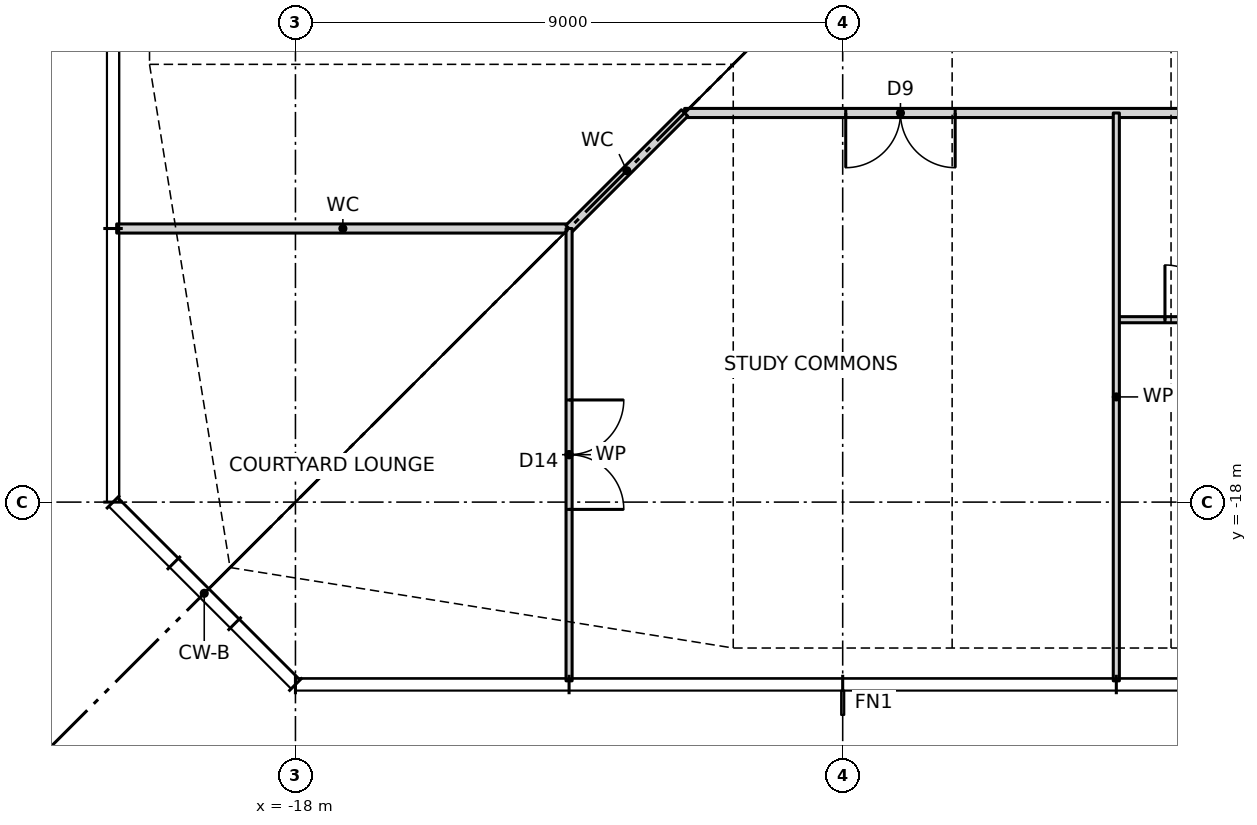
"""IFC4 building model, lengths in metres.
Left out: names, types, materials, properties, quantities, classifications, styles, units other than length and angle.
Written with IfcOpenShell. Run it as: python <this file> out.ifc"""

import sys

from ifc_helpers import new_model, si_unit, direction, frame, frame_2d, origin, place, context, subcontext, project, spatial, rectangle, extrude, element, fill, save


model = new_model("IFC4")
c1 = context("Model", 3, precision=1e-05, world=origin(), true_north=direction((0.0, 1.0)))
c2 = subcontext(c1, "Body", "Model", "MODEL_VIEW")
j1 = project(units=[si_unit("LENGTHUNIT", "METRE"), si_unit("PLANEANGLEUNIT", "RADIAN")], contexts=[c1])
p1 = place(None, origin())
s1 = spatial("IfcSite", under=j1, at=p1, CompositionType="ELEMENT")
p2 = place(p1, origin())
s2 = spatial("IfcBuilding", under=s1, at=p2, CompositionType="ELEMENT")
p3 = place(p2, frame((0.0, 0.0, 140.0)))
s3 = spatial("IfcBuildingStorey", under=s2, at=p3, CompositionType="ELEMENT", Elevation=140.0)
p4 = place(p3, frame((-4.5, -15.0, 0.0), z_axis=(0.0, 0.0, 1.0), x_axis=(1.0, 0.0, 0.0)))
e1 = element("IfcWall", 1, at=p4, inside=s3, PredefinedType="PARTITIONING", context=c2, shape_type="SweptSolid", body=[
    extrude(rectangle(XDim=13.5, YDim=0.1, at=frame_2d((6.75, 0.0))), origin(), (0.0, 0.0, 1.0), 3.2),
])
p5 = place(p4, frame((0.8, 0.0, 0.0)))
e2 = element("IfcOpeningElement", 2, at=p5, cuts=e1, PredefinedType="OPENING", context=c2, shape_type="SweptSolid", body=[
    extrude(rectangle(XDim=0.9, YDim=2.1, at=frame_2d((0.45, 1.05))), frame((0.0, 0.06, 0.0), z_axis=(0.0, -1.0, 0.0), x_axis=(1.0, 0.0, 0.0)), (0.0, 0.0, 1.0), 0.12),
])
p6 = place(p4, frame((7.3, 0.0, 0.0)))
e3 = element("IfcOpeningElement", 3, at=p6, cuts=e1, PredefinedType="OPENING", context=c2, shape_type="SweptSolid", body=[
    extrude(rectangle(XDim=0.9, YDim=2.1, at=frame_2d((0.45, 1.05))), frame((0.0, 0.06, 0.0), z_axis=(0.0, -1.0, 0.0), x_axis=(1.0, 0.0, 0.0)), (0.0, 0.0, 1.0), 0.12),
])
p7 = place(p4, frame((9.8, 0.0, 0.0)))
e4 = element("IfcOpeningElement", 4, at=p7, cuts=e1, PredefinedType="OPENING", context=c2, shape_type="SweptSolid", body=[
    extrude(rectangle(XDim=0.9, YDim=2.1, at=frame_2d((0.45, 1.05))), frame((0.0, 0.06, 0.0), z_axis=(0.0, -1.0, 0.0), x_axis=(1.0, 0.0, 0.0)), (0.0, 0.0, 1.0), 0.12),
])
p8 = place(p3, frame((-20.94, -13.5, 0.0), z_axis=(0.0, 0.0, 1.0), x_axis=(1.0, 0.0, 0.0)))
e5 = element("IfcWall", 5, at=p8, inside=s3, PredefinedType="PARTITIONING", context=c2, shape_type="SweptSolid", body=[
    extrude(rectangle(XDim=7.44, YDim=0.15, at=frame_2d((3.72, 0.0))), origin(), (0.0, 0.0, 1.0), 3.2),
])
p9 = place(p3, frame((-11.6, -11.6, 0.0), z_axis=(0.0, 0.0, 1.0), x_axis=(1.0, 0.0, 0.0)))
e6 = element("IfcWall", 6, at=p9, inside=s3, PredefinedType="PARTITIONING", context=c2, shape_type="SweptSolid", body=[
    extrude(rectangle(XDim=20.6, YDim=0.15, at=frame_2d((10.3, 0.0))), origin(), (0.0, 0.0, 1.0), 3.2),
])
p10 = place(p9, frame((2.65, 0.0, 0.0)))
e7 = element("IfcOpeningElement", 7, at=p10, cuts=e6, PredefinedType="OPENING", context=c2, shape_type="SweptSolid", body=[
    extrude(rectangle(XDim=1.8, YDim=2.1, at=frame_2d((0.9, 1.05))), frame((0.0, 0.085, 0.0), z_axis=(0.0, -1.0, 0.0), x_axis=(1.0, 0.0, 0.0)), (0.0, 0.0, 1.0), 0.17),
])
p11 = place(p9, frame((8.35, 0.0, 0.0)))
e8 = element("IfcOpeningElement", 8, at=p11, cuts=e6, PredefinedType="OPENING", context=c2, shape_type="SweptSolid", body=[
    extrude(rectangle(XDim=1.0, YDim=2.1, at=frame_2d((0.5, 1.05))), frame((0.0, 0.085, 0.0), z_axis=(0.0, -1.0, 0.0), x_axis=(1.0, 0.0, 0.0)), (0.0, 0.0, 1.0), 0.17),
])
p12 = place(p3, frame((-13.5, -13.5, 0.0), z_axis=(0.0, 0.0, 1.0), x_axis=(0.707106781187, 0.707106781187, 0.0)))
e9 = element("IfcWall", 9, at=p12, inside=s3, PredefinedType="PARTITIONING", context=c2, shape_type="SweptSolid", body=[
    extrude(rectangle(XDim=2.687, YDim=0.15, at=frame_2d((1.343, 0.0))), origin(), (0.0, 0.0, 1.0), 3.2),
])
p13 = place(p3, frame((-4.5, -20.94, 0.0), z_axis=(0.0, 0.0, 1.0), x_axis=(0.0, 1.0, 0.0)))
e10 = element("IfcWall", 10, at=p13, inside=s3, PredefinedType="PARTITIONING", context=c2, shape_type="SweptSolid", body=[
    extrude(rectangle(XDim=9.34, YDim=0.1, at=frame_2d((4.67, 0.0))), origin(), (0.0, 0.0, 1.0), 3.2),
])
p14 = place(p3, frame((-13.5, -20.94, 0.0), z_axis=(0.0, 0.0, 1.0), x_axis=(0.0, 1.0, 0.0)))
e11 = element("IfcWall", 11, at=p14, inside=s3, PredefinedType="PARTITIONING", context=c2, shape_type="SweptSolid", body=[
    extrude(rectangle(XDim=7.44, YDim=0.1, at=frame_2d((3.72, 0.0))), origin(), (0.0, 0.0, 1.0), 3.2),
])
p15 = place(p14, frame((2.82, 0.0, 0.0)))
e12 = element("IfcOpeningElement", 12, at=p15, cuts=e11, PredefinedType="OPENING", context=c2, shape_type="SweptSolid", body=[
    extrude(rectangle(XDim=1.8, YDim=2.1, at=frame_2d((0.9, 1.05))), frame((0.0, 0.06, 0.0), z_axis=(0.0, -1.0, 0.0), x_axis=(1.0, 0.0, 0.0)), (0.0, 0.0, 1.0), 0.12),
])
p16 = place(p10, frame((1.8, 0.0, 0.0), z_axis=(0.0, 0.0, 1.0), x_axis=(-1.0, 0.0, 0.0)))
e13 = element("IfcDoor", 13, at=p16, inside=s3, OperationType="DOUBLE_DOOR_SINGLE_SWING", PredefinedType="DOOR", context=c2, shape_type="SweptSolid", body=[
    extrude(rectangle(XDim=1.8, YDim=2.1, at=frame_2d((0.9, 1.05))), frame((0.0, 0.025, 0.0), z_axis=(0.0, -1.0, 0.0), x_axis=(1.0, 0.0, 0.0)), (0.0, 0.0, 1.0), 0.05),
])
fill(e7, e13)
p17 = place(p5, origin())
e14 = element("IfcDoor", 14, at=p17, inside=s3, OperationType="SINGLE_SWING_LEFT", PredefinedType="DOOR", context=c2, shape_type="SweptSolid", body=[
    extrude(rectangle(XDim=0.9, YDim=2.1, at=frame_2d((0.45, 1.05))), frame((0.0, 0.025, 0.0), z_axis=(0.0, -1.0, 0.0), x_axis=(1.0, 0.0, 0.0)), (0.0, 0.0, 1.0), 0.05),
])
fill(e2, e14)
p18 = place(p15, frame((1.8, 0.0, 0.0), z_axis=(0.0, 0.0, 1.0), x_axis=(-1.0, 0.0, 0.0)))
e15 = element("IfcDoor", 15, at=p18, inside=s3, OperationType="DOUBLE_DOOR_SINGLE_SWING", PredefinedType="DOOR", context=c2, shape_type="SweptSolid", body=[
    extrude(rectangle(XDim=1.8, YDim=2.1, at=frame_2d((0.9, 1.05))), frame((0.0, 0.025, 0.0), z_axis=(0.0, -1.0, 0.0), x_axis=(1.0, 0.0, 0.0)), (0.0, 0.0, 1.0), 0.05),
])
fill(e12, e15)
save(model, sys.argv[1])
